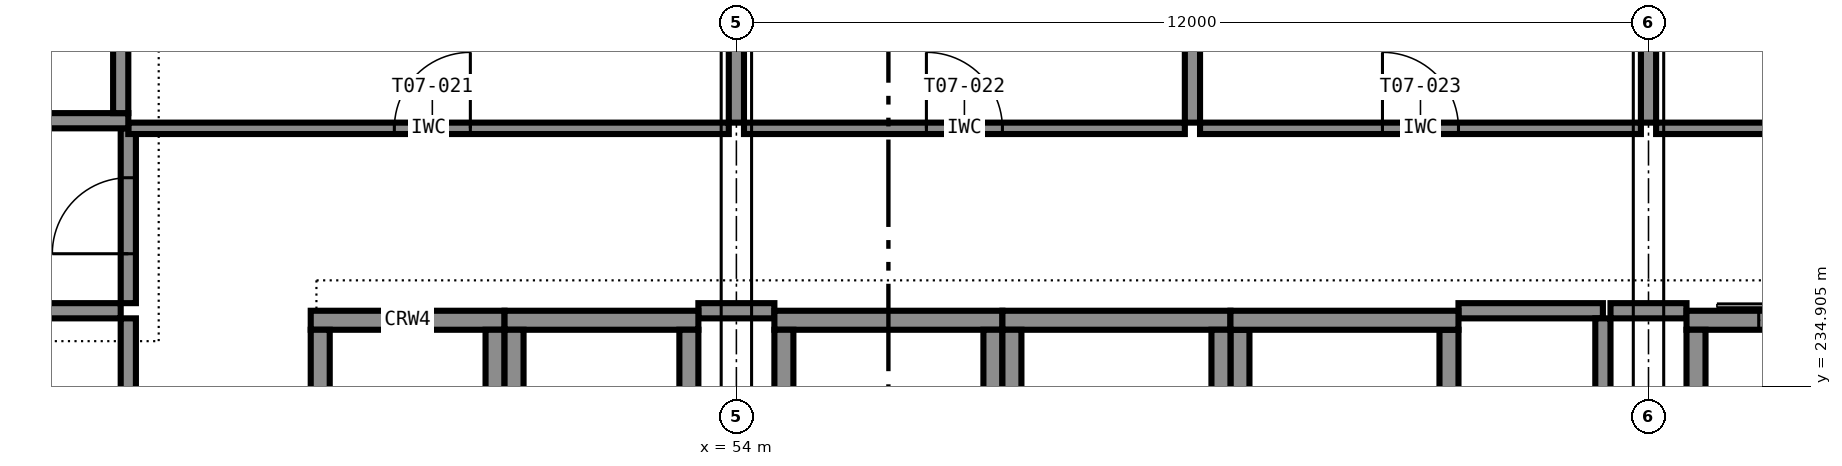
"""IFC4 building model, lengths in metres.
Left out: names, types, materials, properties, quantities, classifications, styles, units other than length and angle.
Written with IfcOpenShell. Run it as: python <this file> out.ifc"""

import sys

from ifc_helpers import new_model, si_unit, direction, frame, frame_2d, origin, place, context, subcontext, project, spatial, rectangle, extrude, element, fill, save


model = new_model("IFC4")
c1 = context("Model", 3, precision=1e-05, world=origin(), true_north=direction((0.0, 1.0)))
c2 = subcontext(c1, "Body", "Model", "MODEL_VIEW")
j1 = project(units=[si_unit("LENGTHUNIT", "METRE"), si_unit("PLANEANGLEUNIT", "RADIAN")], contexts=[c1])
p1 = place(None, origin())
s1 = spatial("IfcSite", under=j1, at=p1, CompositionType="ELEMENT")
p2 = place(p1, origin())
s2 = spatial("IfcBuilding", under=s1, at=p2, CompositionType="ELEMENT")
p3 = place(p2, frame((0.0, 0.0, 39.0)))
s3 = spatial("IfcBuildingStorey", under=s2, at=p3, CompositionType="ELEMENT", Elevation=39.0)
p4 = place(p3, frame((54.5, 235.775, 0.0), z_axis=(0.0, 0.0, 1.0), x_axis=(1.0, 0.0, 0.0)))
e1 = element("IfcWall", 1, at=p4, inside=s3, PredefinedType="SHEAR", context=c2, shape_type="SweptSolid", body=[
    extrude(rectangle(XDim=3.0, YDim=0.25, at=frame_2d((1.5, 0.0))), origin(), (0.0, 0.0, 1.0), 3.6),
])
for number, where, z_axis, x_axis in (
    (2, (54.625, 232.35, 0.0), (0.0, 0.0, 1.0), (0.0, 1.0, 0.0)),
    (3, (57.375, 232.35, 0.0), (0.0, 0.0, 1.0), (0.0, 1.0, 0.0)),
):
    element("IfcWall", number, at=place(p3, frame(where, z_axis=z_axis, x_axis=x_axis)), inside=s3, PredefinedType="SHEAR", context=c2, shape_type="SweptSolid", body=[
        extrude(rectangle(XDim=3.3, YDim=0.25, at=frame_2d((1.65, 0.0))), origin(), (0.0, 0.0, 1.0), 3.6),
    ])
p5 = place(p3, frame((57.5, 235.775, 0.0), z_axis=(0.0, 0.0, 1.0), x_axis=(1.0, 0.0, 0.0)))
e4 = element("IfcWall", 4, at=p5, inside=s3, PredefinedType="SHEAR", context=c2, shape_type="SweptSolid", body=[
    extrude(rectangle(XDim=3.0, YDim=0.25, at=frame_2d((1.5, 0.0))), origin(), (0.0, 0.0, 1.0), 3.6),
])
for number, where, z_axis, x_axis in (
    (5, (57.625, 232.35, 0.0), (0.0, 0.0, 1.0), (0.0, 1.0, 0.0)),
    (6, (60.375, 232.35, 0.0), (0.0, 0.0, 1.0), (0.0, 1.0, 0.0)),
):
    element("IfcWall", number, at=place(p3, frame(where, z_axis=z_axis, x_axis=x_axis)), inside=s3, PredefinedType="SHEAR", context=c2, shape_type="SweptSolid", body=[
        extrude(rectangle(XDim=3.3, YDim=0.25, at=frame_2d((1.65, 0.0))), origin(), (0.0, 0.0, 1.0), 3.6),
    ])
p6 = place(p3, frame((60.5, 235.775, 0.0), z_axis=(0.0, 0.0, 1.0), x_axis=(1.0, 0.0, 0.0)))
e7 = element("IfcWall", 7, at=p6, inside=s3, PredefinedType="SHEAR", context=c2, shape_type="SweptSolid", body=[
    extrude(rectangle(XDim=3.0, YDim=0.25, at=frame_2d((1.5, 0.0))), origin(), (0.0, 0.0, 1.0), 3.6),
])
for number, where, z_axis, x_axis in (
    (8, (60.625, 232.35, 0.0), (0.0, 0.0, 1.0), (0.0, 1.0, 0.0)),
    (9, (63.375, 232.35, 0.0), (0.0, 0.0, 1.0), (0.0, 1.0, 0.0)),
):
    element("IfcWall", number, at=place(p3, frame(where, z_axis=z_axis, x_axis=x_axis)), inside=s3, PredefinedType="SHEAR", context=c2, shape_type="SweptSolid", body=[
        extrude(rectangle(XDim=3.3, YDim=0.25, at=frame_2d((1.65, 0.0))), origin(), (0.0, 0.0, 1.0), 3.6),
    ])
p7 = place(p3, frame((66.5, 235.775, 0.0), z_axis=(0.0, 0.0, 1.0), x_axis=(1.0, 0.0, 0.0)))
e10 = element("IfcWall", 10, at=p7, inside=s3, PredefinedType="SHEAR", context=c2, shape_type="SweptSolid", body=[
    extrude(rectangle(XDim=3.0, YDim=0.25, at=frame_2d((1.5, 0.0))), origin(), (0.0, 0.0, 1.0), 3.6),
])
p8 = place(p7, frame((0.95, 0.0, 0.0)))
e11 = element("IfcOpeningElement", 11, at=p8, cuts=e10, PredefinedType="OPENING", context=c2, shape_type="SweptSolid", body=[
    extrude(rectangle(XDim=1.1, YDim=2.1, at=frame_2d((0.55, 1.05))), frame((0.0, 0.135, 0.0), z_axis=(0.0, -1.0, 0.0), x_axis=(1.0, 0.0, 0.0)), (0.0, 0.0, 1.0), 0.27),
])
p9 = place(p3, frame((66.625, 232.35, 0.0), z_axis=(0.0, 0.0, 1.0), x_axis=(0.0, 1.0, 0.0)))
e12 = element("IfcWall", 12, at=p9, inside=s3, PredefinedType="SHEAR", context=c2, shape_type="SweptSolid", body=[
    extrude(rectangle(XDim=3.3, YDim=0.25, at=frame_2d((1.65, 0.0))), origin(), (0.0, 0.0, 1.0), 3.6),
])
p10 = place(p3, frame((48.4, 235.775, 0.0), z_axis=(0.0, 0.0, 1.0), x_axis=(1.0, 0.0, 0.0)))
e13 = element("IfcWall", 13, at=p10, inside=s3, PredefinedType="SHEAR", context=c2, shape_type="SweptSolid", body=[
    extrude(rectangle(XDim=2.55, YDim=0.25, at=frame_2d((1.275, 0.0))), origin(), (0.0, 0.0, 1.0), 3.6),
])
for number, where, z_axis, x_axis in (
    (14, (48.525, 232.35, 0.0), (0.0, 0.0, 1.0), (0.0, 1.0, 0.0)),
    (15, (50.825, 232.35, 0.0), (0.0, 0.0, 1.0), (0.0, 1.0, 0.0)),
):
    element("IfcWall", number, at=place(p3, frame(where, z_axis=z_axis, x_axis=x_axis)), inside=s3, PredefinedType="SHEAR", context=c2, shape_type="SweptSolid", body=[
        extrude(rectangle(XDim=3.3, YDim=0.25, at=frame_2d((1.65, 0.0))), origin(), (0.0, 0.0, 1.0), 3.6),
    ])
p11 = place(p3, frame((50.95, 235.775, 0.0), z_axis=(0.0, 0.0, 1.0), x_axis=(1.0, 0.0, 0.0)))
e16 = element("IfcWall", 16, at=p11, inside=s3, PredefinedType="SHEAR", context=c2, shape_type="SweptSolid", body=[
    extrude(rectangle(XDim=2.55, YDim=0.25, at=frame_2d((1.275, 0.0))), origin(), (0.0, 0.0, 1.0), 3.6),
])
for number, where, z_axis, x_axis in (
    (17, (51.075, 232.35, 0.0), (0.0, 0.0, 1.0), (0.0, 1.0, 0.0)),
    (18, (53.375, 232.35, 0.0), (0.0, 0.0, 1.0), (0.0, 1.0, 0.0)),
):
    element("IfcWall", number, at=place(p3, frame(where, z_axis=z_axis, x_axis=x_axis)), inside=s3, PredefinedType="SHEAR", context=c2, shape_type="SweptSolid", body=[
        extrude(rectangle(XDim=3.3, YDim=0.25, at=frame_2d((1.65, 0.0))), origin(), (0.0, 0.0, 1.0), 3.6),
    ])
p12 = place(p3, frame((42.5, 238.4, 0.0), z_axis=(0.0, 0.0, 1.0), x_axis=(1.0, 0.0, 0.0)))
e19 = element("IfcWall", 19, at=p12, inside=s3, PredefinedType="SHEAR", context=c2, shape_type="SweptSolid", body=[
    extrude(rectangle(XDim=3.5, YDim=0.2, at=frame_2d((1.75, 0.0))), origin(), (0.0, 0.0, 1.0), 3.6),
])
p13 = place(p12, frame((1.15, 0.0, 0.0)))
e20 = element("IfcOpeningElement", 20, at=p13, cuts=e19, PredefinedType="OPENING", context=c2, shape_type="SweptSolid", body=[
    extrude(rectangle(XDim=1.2, YDim=2.1, at=frame_2d((0.6, 1.05))), frame((0.0, 0.11, 0.0), z_axis=(0.0, -1.0, 0.0), x_axis=(1.0, 0.0, 0.0)), (0.0, 0.0, 1.0), 0.22),
])
p14 = place(p3, frame((45.9, 238.5, 0.0), z_axis=(0.0, 0.0, 1.0), x_axis=(0.0, 1.0, 0.0)))
e21 = element("IfcWall", 21, at=p14, inside=s3, PredefinedType="SHEAR", context=c2, shape_type="SweptSolid", body=[
    extrude(rectangle(XDim=7.0, YDim=0.2, at=frame_2d((3.5, 0.0))), origin(), (0.0, 0.0, 1.0), 3.6),
])
p15 = place(p3, frame((42.3, 235.9, 0.0), z_axis=(0.0, 0.0, 1.0), x_axis=(1.0, 0.0, 0.0)))
e22 = element("IfcWall", 22, at=p15, inside=s3, PredefinedType="PARTITIONING", context=c2, shape_type="SweptSolid", body=[
    extrude(rectangle(XDim=3.6, YDim=0.2, at=frame_2d((1.8, 0.0))), origin(), (0.0, 0.0, 1.0), 3.4),
])
p16 = place(p3, frame((53.5, 235.9, 0.0), z_axis=(0.0, 0.0, 1.0), x_axis=(1.0, 0.0, 0.0)))
e23 = element("IfcWall", 23, at=p16, inside=s3, PredefinedType="PARTITIONING", context=c2, shape_type="SweptSolid", body=[
    extrude(rectangle(XDim=1.0, YDim=0.2, at=frame_2d((0.5, 0.0))), origin(), (0.0, 0.0, 1.0), 3.4),
])
p17 = place(p3, frame((63.5, 235.9, 0.0), z_axis=(0.0, 0.0, 1.0), x_axis=(1.0, 0.0, 0.0)))
e24 = element("IfcWall", 24, at=p17, inside=s3, PredefinedType="PARTITIONING", context=c2, shape_type="SweptSolid", body=[
    extrude(rectangle(XDim=1.9, YDim=0.2, at=frame_2d((0.95, 0.0))), origin(), (0.0, 0.0, 1.0), 3.4),
])
p18 = place(p3, frame((65.5, 235.9, 0.0), z_axis=(0.0, 0.0, 1.0), x_axis=(1.0, 0.0, 0.0)))
e25 = element("IfcWall", 25, at=p18, inside=s3, PredefinedType="PARTITIONING", context=c2, shape_type="SweptSolid", body=[
    extrude(rectangle(XDim=1.0, YDim=0.2, at=frame_2d((0.5, 0.0))), origin(), (0.0, 0.0, 1.0), 3.4),
])
p19 = place(p3, frame((46.0, 232.2, 0.0), z_axis=(0.0, 0.0, 1.0), x_axis=(0.0, 1.0, 0.0)))
e26 = element("IfcWall", 26, at=p19, inside=s3, PredefinedType="PARTITIONING", context=c2, shape_type="SweptSolid", body=[
    extrude(rectangle(XDim=3.6, YDim=0.2, at=frame_2d((1.8, 0.0))), origin(), (0.0, 0.0, 1.0), 3.4),
])
p20 = place(p19, frame((1.35, 0.0, 0.0)))
e27 = element("IfcOpeningElement", 27, at=p20, cuts=e26, PredefinedType="OPENING", context=c2, shape_type="SweptSolid", body=[
    extrude(rectangle(XDim=0.9, YDim=2.1, at=frame_2d((0.45, 1.05))), frame((0.0, 0.11, 0.0), z_axis=(0.0, -1.0, 0.0), x_axis=(1.0, 0.0, 0.0)), (0.0, 0.0, 1.0), 0.22),
])
p21 = place(p3, frame((46.0, 236.0, 0.0), z_axis=(0.0, 0.0, 1.0), x_axis=(0.0, 1.0, 0.0)))
e28 = element("IfcWall", 28, at=p21, inside=s3, PredefinedType="PARTITIONING", context=c2, shape_type="SweptSolid", body=[
    extrude(rectangle(XDim=2.3, YDim=0.2, at=frame_2d((1.15, 0.0))), origin(), (0.0, 0.0, 1.0), 3.4),
])
p22 = place(p21, frame((0.65, 0.0, 0.0)))
e29 = element("IfcOpeningElement", 29, at=p22, cuts=e28, PredefinedType="OPENING", context=c2, shape_type="SweptSolid", body=[
    extrude(rectangle(XDim=1.0, YDim=2.1, at=frame_2d((0.5, 1.05))), frame((0.0, 0.11, 0.0), z_axis=(0.0, -1.0, 0.0), x_axis=(1.0, 0.0, 0.0)), (0.0, 0.0, 1.0), 0.22),
])
p23 = place(p3, frame((65.4, 232.2, 0.0), z_axis=(0.0, 0.0, 1.0), x_axis=(0.0, 1.0, 0.0)))
e30 = element("IfcWall", 30, at=p23, inside=s3, PredefinedType="PARTITIONING", context=c2, shape_type="SweptSolid", body=[
    extrude(rectangle(XDim=3.6, YDim=0.2, at=frame_2d((1.8, 0.0))), origin(), (0.0, 0.0, 1.0), 3.4),
])
p24 = place(p3, frame((46.0, 238.3, 0.0), z_axis=(0.0, 0.0, 1.0), x_axis=(1.0, 0.0, 0.0)))
e31 = element("IfcWall", 31, at=p24, inside=s3, PredefinedType="PARTITIONING", context=c2, shape_type="SweptSolid", body=[
    extrude(rectangle(XDim=7.9, YDim=0.15, at=frame_2d((3.95, 0.0))), origin(), (0.0, 0.0, 1.0), 3.4),
])
p25 = place(p24, frame((3.5, 0.0, 0.0)))
e32 = element("IfcOpeningElement", 32, at=p25, cuts=e31, PredefinedType="OPENING", context=c2, shape_type="SweptSolid", body=[
    extrude(rectangle(XDim=1.0, YDim=2.1, at=frame_2d((0.5, 1.05))), frame((0.0, 0.085, 0.0), z_axis=(0.0, -1.0, 0.0), x_axis=(1.0, 0.0, 0.0)), (0.0, 0.0, 1.0), 0.17),
])
p26 = place(p3, frame((54.1, 238.3, 0.0), z_axis=(0.0, 0.0, 1.0), x_axis=(1.0, 0.0, 0.0)))
e33 = element("IfcWall", 33, at=p26, inside=s3, PredefinedType="PARTITIONING", context=c2, shape_type="SweptSolid", body=[
    extrude(rectangle(XDim=5.8, YDim=0.15, at=frame_2d((2.9, 0.0))), origin(), (0.0, 0.0, 1.0), 3.4),
])
p27 = place(p26, frame((2.4, 0.0, 0.0)))
e34 = element("IfcOpeningElement", 34, at=p27, cuts=e33, PredefinedType="OPENING", context=c2, shape_type="SweptSolid", body=[
    extrude(rectangle(XDim=1.0, YDim=2.1, at=frame_2d((0.5, 1.05))), frame((0.0, 0.085, 0.0), z_axis=(0.0, -1.0, 0.0), x_axis=(1.0, 0.0, 0.0)), (0.0, 0.0, 1.0), 0.17),
])
p28 = place(p3, frame((60.1, 238.3, 0.0), z_axis=(0.0, 0.0, 1.0), x_axis=(1.0, 0.0, 0.0)))
e35 = element("IfcWall", 35, at=p28, inside=s3, PredefinedType="PARTITIONING", context=c2, shape_type="SweptSolid", body=[
    extrude(rectangle(XDim=5.8, YDim=0.15, at=frame_2d((2.9, 0.0))), origin(), (0.0, 0.0, 1.0), 3.4),
])
p29 = place(p28, frame((2.4, 0.0, 0.0)))
e36 = element("IfcOpeningElement", 36, at=p29, cuts=e35, PredefinedType="OPENING", context=c2, shape_type="SweptSolid", body=[
    extrude(rectangle(XDim=1.0, YDim=2.1, at=frame_2d((0.5, 1.05))), frame((0.0, 0.085, 0.0), z_axis=(0.0, -1.0, 0.0), x_axis=(1.0, 0.0, 0.0)), (0.0, 0.0, 1.0), 0.17),
])
p30 = place(p3, frame((66.1, 238.3, 0.0), z_axis=(0.0, 0.0, 1.0), x_axis=(1.0, 0.0, 0.0)))
e37 = element("IfcWall", 37, at=p30, inside=s3, PredefinedType="PARTITIONING", context=c2, shape_type="SweptSolid", body=[
    extrude(rectangle(XDim=3.8, YDim=0.15, at=frame_2d((1.9, 0.0))), origin(), (0.0, 0.0, 1.0), 3.4),
])
p31 = place(p30, frame((2.25, 0.0, 0.0)))
e38 = element("IfcOpeningElement", 38, at=p31, cuts=e37, PredefinedType="OPENING", context=c2, shape_type="SweptSolid", body=[
    extrude(rectangle(XDim=1.0, YDim=2.1, at=frame_2d((0.5, 1.05))), frame((0.0, 0.085, 0.0), z_axis=(0.0, -1.0, 0.0), x_axis=(1.0, 0.0, 0.0)), (0.0, 0.0, 1.0), 0.17),
])
p32 = place(p3, frame((54.0, 245.6, 0.0), z_axis=(0.0, 0.0, 1.0), x_axis=(0.0, -1.0, 0.0)))
e39 = element("IfcWall", 39, at=p32, inside=s3, PredefinedType="PARTITIONING", context=c2, shape_type="SweptSolid", body=[
    extrude(rectangle(XDim=7.225, YDim=0.2, at=frame_2d((3.613, 0.0))), origin(), (0.0, 0.0, 1.0), 2.6),
])
p33 = place(p3, frame((60.0, 245.7, 0.0), z_axis=(0.0, 0.0, 1.0), x_axis=(0.0, -1.0, 0.0)))
e40 = element("IfcWall", 40, at=p33, inside=s3, PredefinedType="PARTITIONING", context=c2, shape_type="SweptSolid", body=[
    extrude(rectangle(XDim=7.325, YDim=0.2, at=frame_2d((3.663, 0.0))), origin(), (0.0, 0.0, 1.0), 3.4),
])
p34 = place(p3, frame((66.0, 245.6, 0.0), z_axis=(0.0, 0.0, 1.0), x_axis=(0.0, -1.0, 0.0)))
e41 = element("IfcWall", 41, at=p34, inside=s3, PredefinedType="PARTITIONING", context=c2, shape_type="SweptSolid", body=[
    extrude(rectangle(XDim=7.225, YDim=0.2, at=frame_2d((3.613, 0.0))), origin(), (0.0, 0.0, 1.0), 2.6),
])
p35 = place(p22, origin())
e42 = element("IfcDoor", 42, at=p35, inside=s3, OperationType="SINGLE_SWING_LEFT", PredefinedType="DOOR", context=c2, shape_type="SweptSolid", body=[
    extrude(rectangle(XDim=1.0, YDim=2.1, at=frame_2d((0.5, 1.05))), frame((0.0, 0.025, 0.0), z_axis=(0.0, -1.0, 0.0), x_axis=(1.0, 0.0, 0.0)), (0.0, 0.0, 1.0), 0.05),
])
fill(e29, e42)
p36 = place(p25, origin())
e43 = element("IfcDoor", 43, at=p36, inside=s3, OperationType="SINGLE_SWING_RIGHT", PredefinedType="DOOR", context=c2, shape_type="SweptSolid", body=[
    extrude(rectangle(XDim=1.0, YDim=2.1, at=frame_2d((0.5, 1.05))), frame((0.0, 0.025, 0.0), z_axis=(0.0, -1.0, 0.0), x_axis=(1.0, 0.0, 0.0)), (0.0, 0.0, 1.0), 0.05),
])
fill(e32, e43)
p37 = place(p27, origin())
e44 = element("IfcDoor", 44, at=p37, inside=s3, OperationType="SINGLE_SWING_LEFT", PredefinedType="DOOR", context=c2, shape_type="SweptSolid", body=[
    extrude(rectangle(XDim=1.0, YDim=2.1, at=frame_2d((0.5, 1.05))), frame((0.0, 0.025, 0.0), z_axis=(0.0, -1.0, 0.0), x_axis=(1.0, 0.0, 0.0)), (0.0, 0.0, 1.0), 0.05),
])
fill(e34, e44)
p38 = place(p29, origin())
e45 = element("IfcDoor", 45, at=p38, inside=s3, OperationType="SINGLE_SWING_LEFT", PredefinedType="DOOR", context=c2, shape_type="SweptSolid", body=[
    extrude(rectangle(XDim=1.0, YDim=2.1, at=frame_2d((0.5, 1.05))), frame((0.0, 0.025, 0.0), z_axis=(0.0, -1.0, 0.0), x_axis=(1.0, 0.0, 0.0)), (0.0, 0.0, 1.0), 0.05),
])
fill(e36, e45)
p39 = place(p8, origin())
e46 = element("IfcDoor", 46, at=p39, inside=s3, OperationType="SLIDING_TO_LEFT", PredefinedType="DOOR", context=c2, shape_type="SweptSolid", body=[
    extrude(rectangle(XDim=1.1, YDim=2.1, at=frame_2d((0.55, 1.05))), frame((0.0, 0.025, 0.0), z_axis=(0.0, -1.0, 0.0), x_axis=(1.0, 0.0, 0.0)), (0.0, 0.0, 1.0), 0.05),
])
fill(e11, e46)
save(model, sys.argv[1])
